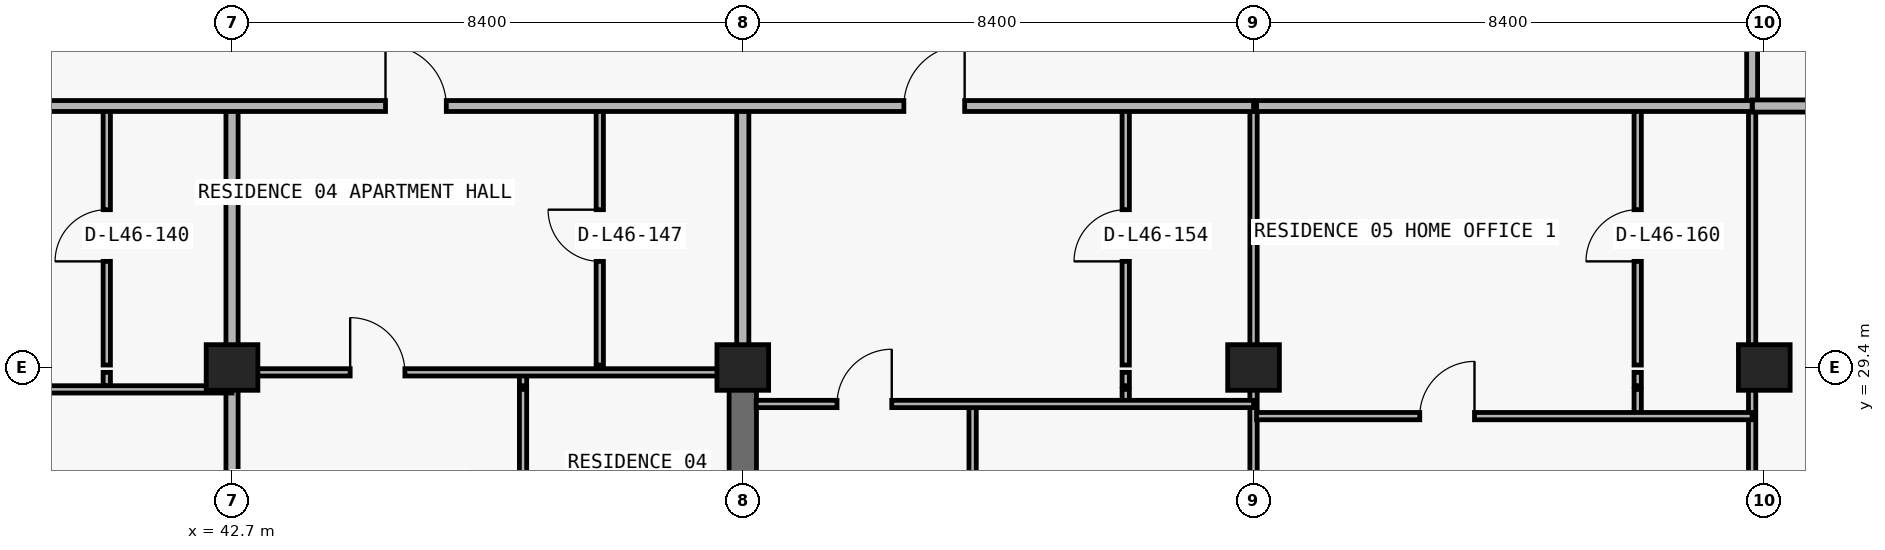
"""IFC4 building model, lengths in metres.
Left out: names, types, materials, properties, quantities, classifications, styles, units other than length and angle.
Written with IfcOpenShell. Run it as: python <this file> out.ifc"""

import sys

from ifc_helpers import new_model, si_unit, direction, frame, frame_2d, origin, origin_2d, place, context, subcontext, project, spatial, rectangle, extrude, element, fill, save


model = new_model("IFC4")
c1 = context("Model", 3, precision=1e-05, world=origin(), true_north=direction((0.0, 1.0)))
c2 = subcontext(c1, "Body", "Model", "MODEL_VIEW")
j1 = project(units=[si_unit("LENGTHUNIT", "METRE"), si_unit("PLANEANGLEUNIT", "RADIAN")], contexts=[c1])
p1 = place(None, origin())
s1 = spatial("IfcSite", under=j1, at=p1, CompositionType="ELEMENT")
p2 = place(p1, origin())
s2 = spatial("IfcBuilding", under=s1, at=p2, CompositionType="ELEMENT")
p3 = place(p2, frame((0.0, 0.0, 167.1)))
s3 = spatial("IfcBuildingStorey", under=s2, at=p3, CompositionType="ELEMENT", Elevation=167.1)
for number, where, z_axis, x_axis in (
    (1, (42.7, 29.4, 0.0), (0.0, 0.0, 1.0), (1.0, 0.0, 0.0)),
    (2, (51.1, 29.4, 0.0), (0.0, 0.0, 1.0), (1.0, 0.0, 0.0)),
    (3, (59.5, 29.4, 0.0), (0.0, 0.0, 1.0), (1.0, 0.0, 0.0)),
    (4, (67.9, 29.4, 0.0), (0.0, 0.0, 1.0), (1.0, 0.0, 0.0)),
):
    element("IfcColumn", number, at=place(p3, frame(where, z_axis=z_axis, x_axis=x_axis)), inside=s3, PredefinedType="COLUMN", context=c2, shape_type="SweptSolid", body=[
        extrude(rectangle(XDim=0.85, YDim=0.75, at=origin_2d()), origin(), (0.0, 0.0, 1.0), 3.05),
    ])
p4 = place(p3, frame((51.1, 20.8, 0.0), z_axis=(0.0, 0.0, 1.0), x_axis=(0.0, 1.0, 0.0)))
e5 = element("IfcWall", 5, at=p4, inside=s3, PredefinedType="SHEAR", context=c2, shape_type="SweptSolid", body=[
    extrude(rectangle(XDim=8.6, YDim=0.45, at=frame_2d((4.3, 0.0))), origin(), (0.0, 0.0, 1.0), 3.05),
])
p5 = place(p3, frame((40.64, 29.1, 0.0), z_axis=(0.0, 0.0, 1.0), x_axis=(0.0, 1.0, 0.0)))
e6 = element("IfcWall", 6, at=p5, inside=s3, PredefinedType="PARTITIONING", context=c2, shape_type="SweptSolid", body=[
    extrude(rectangle(XDim=0.22, YDim=0.12, at=frame_2d((0.11, 0.0))), origin(), (0.0, 0.0, 1.0), 2.725),
])
p6 = place(p3, frame((40.64, 29.44, 0.0), z_axis=(0.0, 0.0, 1.0), x_axis=(0.0, 1.0, 0.0)))
e7 = element("IfcWall", 7, at=p6, inside=s3, PredefinedType="PARTITIONING", context=c2, shape_type="SweptSolid", body=[
    extrude(rectangle(XDim=4.26, YDim=0.12, at=frame_2d((2.13, 0.0))), origin(), (0.0, 0.0, 1.0), 3.05),
])
p7 = place(p6, frame((1.705, 0.0, 0.0)))
e8 = element("IfcOpeningElement", 8, at=p7, cuts=e7, PredefinedType="OPENING", context=c2, shape_type="SweptSolid", body=[
    extrude(rectangle(XDim=0.85, YDim=2.1, at=frame_2d((0.425, 1.05))), frame((0.0, 0.07, 0.0), z_axis=(0.0, -1.0, 0.0), x_axis=(1.0, 0.0, 0.0)), (0.0, 0.0, 1.0), 0.14),
])
p8 = place(p3, frame((42.7, 24.2, 0.0), z_axis=(0.0, 0.0, 1.0), x_axis=(0.0, 1.0, 0.0)))
e9 = element("IfcWall", 9, at=p8, inside=s3, PredefinedType="PARTITIONING", context=c2, shape_type="SweptSolid", body=[
    extrude(rectangle(XDim=4.84, YDim=0.2, at=frame_2d((2.42, 0.0))), origin(), (0.0, 0.0, 1.0), 2.263),
])
p9 = place(p3, frame((42.7, 29.1, 0.0), z_axis=(0.0, 0.0, 1.0), x_axis=(0.0, 1.0, 0.0)))
e10 = element("IfcWall", 10, at=p9, inside=s3, PredefinedType="PARTITIONING", context=c2, shape_type="SweptSolid", body=[
    extrude(rectangle(XDim=0.22, YDim=0.2, at=frame_2d((0.11, 0.0))), origin(), (0.0, 0.0, 1.0), 3.05),
])
p10 = place(p3, frame((42.7, 29.44, 0.0), z_axis=(0.0, 0.0, 1.0), x_axis=(0.0, 1.0, 0.0)))
e11 = element("IfcWall", 11, at=p10, inside=s3, PredefinedType="PARTITIONING", context=c2, shape_type="SweptSolid", body=[
    extrude(rectangle(XDim=4.26, YDim=0.2, at=frame_2d((2.13, 0.0))), origin(), (0.0, 0.0, 1.0), 2.263),
])
p11 = place(p3, frame((47.486, 24.2, 0.0), z_axis=(0.0, 0.0, 1.0), x_axis=(0.0, 1.0, 0.0)))
e12 = element("IfcWall", 12, at=p11, inside=s3, PredefinedType="PARTITIONING", context=c2, shape_type="SweptSolid", body=[
    extrude(rectangle(XDim=4.84, YDim=0.12, at=frame_2d((2.42, 0.0))), origin(), (0.0, 0.0, 1.0), 3.05),
])
p12 = place(p11, frame((1.97, 0.0, 0.0)))
e13 = element("IfcOpeningElement", 13, at=p12, cuts=e12, PredefinedType="OPENING", context=c2, shape_type="SweptSolid", body=[
    extrude(rectangle(XDim=0.9, YDim=2.15, at=frame_2d((0.45, 1.075))), frame((0.0, 0.07, 0.0), z_axis=(0.0, -1.0, 0.0), x_axis=(1.0, 0.0, 0.0)), (0.0, 0.0, 1.0), 0.14),
])
p13 = place(p3, frame((47.486, 29.1, 0.0), z_axis=(0.0, 0.0, 1.0), x_axis=(0.0, 1.0, 0.0)))
e14 = element("IfcWall", 14, at=p13, inside=s3, PredefinedType="PARTITIONING", context=c2, shape_type="SweptSolid", body=[
    extrude(rectangle(XDim=0.22, YDim=0.12, at=frame_2d((0.11, 0.0))), origin(), (0.0, 0.0, 1.0), 3.05),
])
p14 = place(p3, frame((48.748, 29.44, 0.0), z_axis=(0.0, 0.0, 1.0), x_axis=(0.0, 1.0, 0.0)))
e15 = element("IfcWall", 15, at=p14, inside=s3, PredefinedType="PARTITIONING", context=c2, shape_type="SweptSolid", body=[
    extrude(rectangle(XDim=4.26, YDim=0.12, at=frame_2d((2.13, 0.0))), origin(), (0.0, 0.0, 1.0), 3.05),
])
p15 = place(p14, frame((1.705, 0.0, 0.0)))
e16 = element("IfcOpeningElement", 16, at=p15, cuts=e15, PredefinedType="OPENING", context=c2, shape_type="SweptSolid", body=[
    extrude(rectangle(XDim=0.85, YDim=2.1, at=frame_2d((0.425, 1.05))), frame((0.0, 0.07, 0.0), z_axis=(0.0, -1.0, 0.0), x_axis=(1.0, 0.0, 0.0)), (0.0, 0.0, 1.0), 0.14),
])
p16 = place(p3, frame((51.1, 29.44, 0.0), z_axis=(0.0, 0.0, 1.0), x_axis=(0.0, 1.0, 0.0)))
e17 = element("IfcWall", 17, at=p16, inside=s3, PredefinedType="PARTITIONING", context=c2, shape_type="SweptSolid", body=[
    extrude(rectangle(XDim=4.26, YDim=0.2, at=frame_2d((2.13, 0.0))), origin(), (0.0, 0.0, 1.0), 2.335),
])
p17 = place(p3, frame((54.88, 24.2, 0.0), z_axis=(0.0, 0.0, 1.0), x_axis=(0.0, 1.0, 0.0)))
e18 = element("IfcWall", 18, at=p17, inside=s3, PredefinedType="PARTITIONING", context=c2, shape_type="SweptSolid", body=[
    extrude(rectangle(XDim=4.6, YDim=0.12, at=frame_2d((2.3, 0.0))), origin(), (0.0, 0.0, 1.0), 3.05),
])
p18 = place(p17, frame((1.85, 0.0, 0.0)))
e19 = element("IfcOpeningElement", 19, at=p18, cuts=e18, PredefinedType="OPENING", context=c2, shape_type="SweptSolid", body=[
    extrude(rectangle(XDim=0.9, YDim=2.15, at=frame_2d((0.45, 1.075))), frame((0.0, 0.07, 0.0), z_axis=(0.0, -1.0, 0.0), x_axis=(1.0, 0.0, 0.0)), (0.0, 0.0, 1.0), 0.14),
])
p19 = place(p3, frame((57.398, 28.8, 0.0), z_axis=(0.0, 0.0, 1.0), x_axis=(0.0, 1.0, 0.0)))
e20 = element("IfcWall", 20, at=p19, inside=s3, PredefinedType="PARTITIONING", context=c2, shape_type="SweptSolid", body=[
    extrude(rectangle(XDim=0.24, YDim=0.12, at=frame_2d((0.12, 0.0))), origin(), (0.0, 0.0, 1.0), 3.05),
])
p20 = place(p3, frame((57.398, 29.1, 0.0), z_axis=(0.0, 0.0, 1.0), x_axis=(0.0, 1.0, 0.0)))
e21 = element("IfcWall", 21, at=p20, inside=s3, PredefinedType="PARTITIONING", context=c2, shape_type="SweptSolid", body=[
    extrude(rectangle(XDim=0.22, YDim=0.12, at=frame_2d((0.11, 0.0))), origin(), (0.0, 0.0, 1.0), 3.05),
])
p21 = place(p3, frame((57.398, 29.44, 0.0), z_axis=(0.0, 0.0, 1.0), x_axis=(0.0, 1.0, 0.0)))
e22 = element("IfcWall", 22, at=p21, inside=s3, PredefinedType="PARTITIONING", context=c2, shape_type="SweptSolid", body=[
    extrude(rectangle(XDim=4.26, YDim=0.12, at=frame_2d((2.13, 0.0))), origin(), (0.0, 0.0, 1.0), 3.05),
])
p22 = place(p21, frame((1.705, 0.0, 0.0)))
e23 = element("IfcOpeningElement", 23, at=p22, cuts=e22, PredefinedType="OPENING", context=c2, shape_type="SweptSolid", body=[
    extrude(rectangle(XDim=0.85, YDim=2.1, at=frame_2d((0.425, 1.05))), frame((0.0, 0.07, 0.0), z_axis=(0.0, -1.0, 0.0), x_axis=(1.0, 0.0, 0.0)), (0.0, 0.0, 1.0), 0.14),
])
p23 = place(p3, frame((59.5, 24.2, 0.0), z_axis=(0.0, 0.0, 1.0), x_axis=(0.0, 1.0, 0.0)))
e24 = element("IfcWall", 24, at=p23, inside=s3, PredefinedType="PARTITIONING", context=c2, shape_type="SweptSolid", body=[
    extrude(rectangle(XDim=4.84, YDim=0.12, at=frame_2d((2.42, 0.0))), origin(), (0.0, 0.0, 1.0), 2.263),
])
p24 = place(p23, frame((1.75, 0.0, 0.0)))
e25 = element("IfcOpeningElement", 25, at=p24, cuts=e24, PredefinedType="OPENING", context=c2, shape_type="SweptSolid", body=[
    extrude(rectangle(XDim=0.9, YDim=2.15, at=frame_2d((0.45, 1.075))), frame((0.0, 0.07, 0.0), z_axis=(0.0, -1.0, 0.0), x_axis=(1.0, 0.0, 0.0)), (0.0, 0.0, 1.0), 0.14),
])
p25 = place(p3, frame((59.5, 29.1, 0.0), z_axis=(0.0, 0.0, 1.0), x_axis=(0.0, 1.0, 0.0)))
e26 = element("IfcWall", 26, at=p25, inside=s3, PredefinedType="PARTITIONING", context=c2, shape_type="SweptSolid", body=[
    extrude(rectangle(XDim=0.22, YDim=0.12, at=frame_2d((0.11, 0.0))), origin(), (0.0, 0.0, 1.0), 3.05),
])
p26 = place(p3, frame((59.5, 29.44, 0.0), z_axis=(0.0, 0.0, 1.0), x_axis=(0.0, 1.0, 0.0)))
e27 = element("IfcWall", 27, at=p26, inside=s3, PredefinedType="PARTITIONING", context=c2, shape_type="SweptSolid", body=[
    extrude(rectangle(XDim=4.26, YDim=0.12, at=frame_2d((2.13, 0.0))), origin(), (0.0, 0.0, 1.0), 2.263),
])
p27 = place(p3, frame((65.818, 28.6, 0.0), z_axis=(0.0, 0.0, 1.0), x_axis=(0.0, 1.0, 0.0)))
e28 = element("IfcWall", 28, at=p27, inside=s3, PredefinedType="PARTITIONING", context=c2, shape_type="SweptSolid", body=[
    extrude(rectangle(XDim=0.44, YDim=0.12, at=frame_2d((0.22, 0.0))), origin(), (0.0, 0.0, 1.0), 3.05),
])
p28 = place(p3, frame((65.818, 29.1, 0.0), z_axis=(0.0, 0.0, 1.0), x_axis=(0.0, 1.0, 0.0)))
e29 = element("IfcWall", 29, at=p28, inside=s3, PredefinedType="PARTITIONING", context=c2, shape_type="SweptSolid", body=[
    extrude(rectangle(XDim=0.22, YDim=0.12, at=frame_2d((0.11, 0.0))), origin(), (0.0, 0.0, 1.0), 3.05),
])
p29 = place(p3, frame((65.818, 29.44, 0.0), z_axis=(0.0, 0.0, 1.0), x_axis=(0.0, 1.0, 0.0)))
e30 = element("IfcWall", 30, at=p29, inside=s3, PredefinedType="PARTITIONING", context=c2, shape_type="SweptSolid", body=[
    extrude(rectangle(XDim=4.26, YDim=0.12, at=frame_2d((2.13, 0.0))), origin(), (0.0, 0.0, 1.0), 3.05),
])
p30 = place(p29, frame((1.705, 0.0, 0.0)))
e31 = element("IfcOpeningElement", 31, at=p30, cuts=e30, PredefinedType="OPENING", context=c2, shape_type="SweptSolid", body=[
    extrude(rectangle(XDim=0.85, YDim=2.1, at=frame_2d((0.425, 1.05))), frame((0.0, 0.07, 0.0), z_axis=(0.0, -1.0, 0.0), x_axis=(1.0, 0.0, 0.0)), (0.0, 0.0, 1.0), 0.14),
])
p31 = place(p3, frame((67.7, 24.2, 0.0), z_axis=(0.0, 0.0, 1.0), x_axis=(0.0, 1.0, 0.0)))
e32 = element("IfcWall", 32, at=p31, inside=s3, PredefinedType="PARTITIONING", context=c2, shape_type="SweptSolid", body=[
    extrude(rectangle(XDim=4.84, YDim=0.12, at=frame_2d((2.42, 0.0))), origin(), (0.0, 0.0, 1.0), 2.263),
])
p32 = place(p31, frame((1.75, 0.0, 0.0)))
e33 = element("IfcOpeningElement", 33, at=p32, cuts=e32, PredefinedType="OPENING", context=c2, shape_type="SweptSolid", body=[
    extrude(rectangle(XDim=0.9, YDim=2.15, at=frame_2d((0.45, 1.075))), frame((0.0, 0.07, 0.0), z_axis=(0.0, -1.0, 0.0), x_axis=(1.0, 0.0, 0.0)), (0.0, 0.0, 1.0), 0.14),
])
p33 = place(p3, frame((67.7, 29.1, 0.0), z_axis=(0.0, 0.0, 1.0), x_axis=(0.0, 1.0, 0.0)))
e34 = element("IfcWall", 34, at=p33, inside=s3, PredefinedType="PARTITIONING", context=c2, shape_type="SweptSolid", body=[
    extrude(rectangle(XDim=0.22, YDim=0.12, at=frame_2d((0.11, 0.0))), origin(), (0.0, 0.0, 1.0), 3.05),
])
p34 = place(p3, frame((67.7, 29.44, 0.0), z_axis=(0.0, 0.0, 1.0), x_axis=(0.0, 1.0, 0.0)))
e35 = element("IfcWall", 35, at=p34, inside=s3, PredefinedType="PARTITIONING", context=c2, shape_type="SweptSolid", body=[
    extrude(rectangle(XDim=4.26, YDim=0.12, at=frame_2d((2.13, 0.0))), origin(), (0.0, 0.0, 1.0), 2.263),
])
p35 = place(p3, frame((67.7, 33.705, 0.0), z_axis=(0.0, 0.0, 1.0), x_axis=(0.0, 1.0, 0.0)))
e36 = element("IfcWall", 36, at=p35, inside=s3, PredefinedType="PARTITIONING", context=c2, shape_type="SweptSolid", body=[
    extrude(rectangle(XDim=3.245, YDim=0.18, at=frame_2d((1.623, 0.0))), origin(), (0.0, 0.0, 1.0), 2.263),
])
p36 = place(p3, frame((59.55, 28.6, 0.0), z_axis=(0.0, 0.0, 1.0), x_axis=(1.0, 0.0, 0.0)))
e37 = element("IfcWall", 37, at=p36, inside=s3, PredefinedType="PARTITIONING", context=c2, shape_type="SweptSolid", body=[
    extrude(rectangle(XDim=8.15, YDim=0.12, at=frame_2d((4.075, 0.0))), origin(), (0.0, 0.0, 1.0), 3.05),
])
p37 = place(p36, frame((2.684, 0.0, 0.0)))
e38 = element("IfcOpeningElement", 38, at=p37, cuts=e37, PredefinedType="OPENING", context=c2, shape_type="SweptSolid", body=[
    extrude(rectangle(XDim=0.9, YDim=2.15, at=frame_2d((0.45, 1.075))), frame((0.0, 0.07, 0.0), z_axis=(0.0, -1.0, 0.0), x_axis=(1.0, 0.0, 0.0)), (0.0, 0.0, 1.0), 0.14),
])
p38 = place(p3, frame((51.32, 28.8, 0.0), z_axis=(0.0, 0.0, 1.0), x_axis=(1.0, 0.0, 0.0)))
e39 = element("IfcWall", 39, at=p38, inside=s3, PredefinedType="PARTITIONING", context=c2, shape_type="SweptSolid", body=[
    extrude(rectangle(XDim=8.18, YDim=0.12, at=frame_2d((4.09, 0.0))), origin(), (0.0, 0.0, 1.0), 3.05),
])
p39 = place(p38, frame((1.33, 0.0, 0.0)))
e40 = element("IfcOpeningElement", 40, at=p39, cuts=e39, PredefinedType="OPENING", context=c2, shape_type="SweptSolid", body=[
    extrude(rectangle(XDim=0.9, YDim=2.15, at=frame_2d((0.45, 1.075))), frame((0.0, 0.07, 0.0), z_axis=(0.0, -1.0, 0.0), x_axis=(1.0, 0.0, 0.0)), (0.0, 0.0, 1.0), 0.14),
])
p40 = place(p3, frame((35.1, 29.04, 0.0), z_axis=(0.0, 0.0, 1.0), x_axis=(1.0, 0.0, 0.0)))
e41 = element("IfcWall", 41, at=p40, inside=s3, PredefinedType="PARTITIONING", context=c2, shape_type="SweptSolid", body=[
    extrude(rectangle(XDim=7.6, YDim=0.12, at=frame_2d((3.8, 0.0))), origin(), (0.0, 0.0, 1.0), 3.05),
])
p41 = place(p40, frame((1.602, 0.0, 0.0)))
e42 = element("IfcOpeningElement", 42, at=p41, cuts=e41, PredefinedType="OPENING", context=c2, shape_type="SweptSolid", body=[
    extrude(rectangle(XDim=0.9, YDim=2.15, at=frame_2d((0.45, 1.075))), frame((0.0, 0.07, 0.0), z_axis=(0.0, -1.0, 0.0), x_axis=(1.0, 0.0, 0.0)), (0.0, 0.0, 1.0), 0.14),
])
p42 = place(p3, frame((42.7, 29.32, 0.0), z_axis=(0.0, 0.0, 1.0), x_axis=(1.0, 0.0, 0.0)))
e43 = element("IfcWall", 43, at=p42, inside=s3, PredefinedType="PARTITIONING", context=c2, shape_type="SweptSolid", body=[
    extrude(rectangle(XDim=8.18, YDim=0.12, at=frame_2d((4.09, 0.0))), origin(), (0.0, 0.0, 1.0), 2.263),
])
p43 = place(p42, frame((1.943, 0.0, 0.0)))
e44 = element("IfcOpeningElement", 44, at=p43, cuts=e43, PredefinedType="OPENING", context=c2, shape_type="SweptSolid", body=[
    extrude(rectangle(XDim=0.9, YDim=2.15, at=frame_2d((0.45, 1.075))), frame((0.0, 0.07, 0.0), z_axis=(0.0, -1.0, 0.0), x_axis=(1.0, 0.0, 0.0)), (0.0, 0.0, 1.0), 0.14),
])
p44 = place(p3, frame((31.4, 33.7, 0.0), z_axis=(0.0, 0.0, 1.0), x_axis=(1.0, 0.0, 0.0)))
e45 = element("IfcWall", 45, at=p44, inside=s3, PredefinedType="PARTITIONING", context=c2, shape_type="SweptSolid", body=[
    extrude(rectangle(XDim=28.1, YDim=0.18, at=frame_2d((14.05, 0.0))), origin(), (0.0, 0.0, 1.0), 3.05),
])
p45 = place(p44, frame((5.97, 0.0, 0.0)))
e46 = element("IfcOpeningElement", 46, at=p45, cuts=e45, PredefinedType="OPENING", context=c2, shape_type="SweptSolid", body=[
    extrude(rectangle(XDim=1.0, YDim=2.2, at=frame_2d((0.5, 1.1))), frame((0.0, 0.1, 0.0), z_axis=(0.0, -1.0, 0.0), x_axis=(1.0, 0.0, 0.0)), (0.0, 0.0, 1.0), 0.2),
])
p46 = place(p44, frame((13.824, 0.0, 0.0)))
e47 = element("IfcOpeningElement", 47, at=p46, cuts=e45, PredefinedType="OPENING", context=c2, shape_type="SweptSolid", body=[
    extrude(rectangle(XDim=1.0, YDim=2.2, at=frame_2d((0.5, 1.1))), frame((0.0, 0.1, 0.0), z_axis=(0.0, -1.0, 0.0), x_axis=(1.0, 0.0, 0.0)), (0.0, 0.0, 1.0), 0.2),
])
p47 = place(p44, frame((22.349, 0.0, 0.0)))
e48 = element("IfcOpeningElement", 48, at=p47, cuts=e45, PredefinedType="OPENING", context=c2, shape_type="SweptSolid", body=[
    extrude(rectangle(XDim=1.0, YDim=2.2, at=frame_2d((0.5, 1.1))), frame((0.0, 0.1, 0.0), z_axis=(0.0, -1.0, 0.0), x_axis=(1.0, 0.0, 0.0)), (0.0, 0.0, 1.0), 0.2),
])
p48 = place(p3, frame((59.55, 33.7, 0.0), z_axis=(0.0, 0.0, 1.0), x_axis=(1.0, 0.0, 0.0)))
e49 = element("IfcWall", 49, at=p48, inside=s3, PredefinedType="PARTITIONING", context=c2, shape_type="SweptSolid", body=[
    extrude(rectangle(XDim=8.15, YDim=0.18, at=frame_2d((4.075, 0.0))), origin(), (0.0, 0.0, 1.0), 3.05),
])
p49 = place(p3, frame((67.705, 33.7, 0.0), z_axis=(0.0, 0.0, 1.0), x_axis=(1.0, 0.0, 0.0)))
e50 = element("IfcWall", 50, at=p49, inside=s3, PredefinedType="PARTITIONING", context=c2, shape_type="SweptSolid", body=[
    extrude(rectangle(XDim=3.7, YDim=0.2, at=frame_2d((1.85, 0.0))), origin(), (0.0, 0.0, 1.0), 3.05),
])
p50 = place(p7, origin())
e51 = element("IfcDoor", 51, at=p50, inside=s3, OperationType="SINGLE_SWING_LEFT", PredefinedType="DOOR", context=c2, shape_type="SweptSolid", body=[
    extrude(rectangle(XDim=0.85, YDim=2.1, at=frame_2d((0.425, 1.05))), frame((0.0, 0.025, 0.0), z_axis=(0.0, -1.0, 0.0), x_axis=(1.0, 0.0, 0.0)), (0.0, 0.0, 1.0), 0.05),
])
fill(e8, e51)
p51 = place(p46, origin())
e52 = element("IfcDoor", 52, at=p51, inside=s3, OperationType="SINGLE_SWING_LEFT", PredefinedType="DOOR", context=c2, shape_type="SweptSolid", body=[
    extrude(rectangle(XDim=1.0, YDim=2.2, at=frame_2d((0.5, 1.1))), frame((0.0, 0.025, 0.0), z_axis=(0.0, -1.0, 0.0), x_axis=(1.0, 0.0, 0.0)), (0.0, 0.0, 1.0), 0.05),
])
fill(e47, e52)
p52 = place(p15, origin())
e53 = element("IfcDoor", 53, at=p52, inside=s3, OperationType="SINGLE_SWING_RIGHT", PredefinedType="DOOR", context=c2, shape_type="SweptSolid", body=[
    extrude(rectangle(XDim=0.85, YDim=2.1, at=frame_2d((0.425, 1.05))), frame((0.0, 0.025, 0.0), z_axis=(0.0, -1.0, 0.0), x_axis=(1.0, 0.0, 0.0)), (0.0, 0.0, 1.0), 0.05),
])
fill(e16, e53)
p53 = place(p43, origin())
e54 = element("IfcDoor", 54, at=p53, inside=s3, OperationType="SINGLE_SWING_LEFT", PredefinedType="DOOR", context=c2, shape_type="SweptSolid", body=[
    extrude(rectangle(XDim=0.9, YDim=2.15, at=frame_2d((0.45, 1.075))), frame((0.0, 0.025, 0.0), z_axis=(0.0, -1.0, 0.0), x_axis=(1.0, 0.0, 0.0)), (0.0, 0.0, 1.0), 0.05),
])
fill(e44, e54)
p54 = place(p47, origin())
e55 = element("IfcDoor", 55, at=p54, inside=s3, OperationType="SINGLE_SWING_RIGHT", PredefinedType="DOOR", context=c2, shape_type="SweptSolid", body=[
    extrude(rectangle(XDim=1.0, YDim=2.2, at=frame_2d((0.5, 1.1))), frame((0.0, 0.025, 0.0), z_axis=(0.0, -1.0, 0.0), x_axis=(1.0, 0.0, 0.0)), (0.0, 0.0, 1.0), 0.05),
])
fill(e48, e55)
p55 = place(p22, origin())
e56 = element("IfcDoor", 56, at=p55, inside=s3, OperationType="SINGLE_SWING_LEFT", PredefinedType="DOOR", context=c2, shape_type="SweptSolid", body=[
    extrude(rectangle(XDim=0.85, YDim=2.1, at=frame_2d((0.425, 1.05))), frame((0.0, 0.025, 0.0), z_axis=(0.0, -1.0, 0.0), x_axis=(1.0, 0.0, 0.0)), (0.0, 0.0, 1.0), 0.05),
])
fill(e23, e56)
p56 = place(p39, origin())
e57 = element("IfcDoor", 57, at=p56, inside=s3, OperationType="SINGLE_SWING_RIGHT", PredefinedType="DOOR", context=c2, shape_type="SweptSolid", body=[
    extrude(rectangle(XDim=0.9, YDim=2.15, at=frame_2d((0.45, 1.075))), frame((0.0, 0.025, 0.0), z_axis=(0.0, -1.0, 0.0), x_axis=(1.0, 0.0, 0.0)), (0.0, 0.0, 1.0), 0.05),
])
fill(e40, e57)
p57 = place(p37, origin())
e58 = element("IfcDoor", 58, at=p57, inside=s3, OperationType="SINGLE_SWING_RIGHT", PredefinedType="DOOR", context=c2, shape_type="SweptSolid", body=[
    extrude(rectangle(XDim=0.9, YDim=2.15, at=frame_2d((0.45, 1.075))), frame((0.0, 0.025, 0.0), z_axis=(0.0, -1.0, 0.0), x_axis=(1.0, 0.0, 0.0)), (0.0, 0.0, 1.0), 0.05),
])
fill(e38, e58)
p58 = place(p30, origin())
e59 = element("IfcDoor", 59, at=p58, inside=s3, OperationType="SINGLE_SWING_LEFT", PredefinedType="DOOR", context=c2, shape_type="SweptSolid", body=[
    extrude(rectangle(XDim=0.85, YDim=2.1, at=frame_2d((0.425, 1.05))), frame((0.0, 0.025, 0.0), z_axis=(0.0, -1.0, 0.0), x_axis=(1.0, 0.0, 0.0)), (0.0, 0.0, 1.0), 0.05),
])
fill(e31, e59)
save(model, sys.argv[1])
